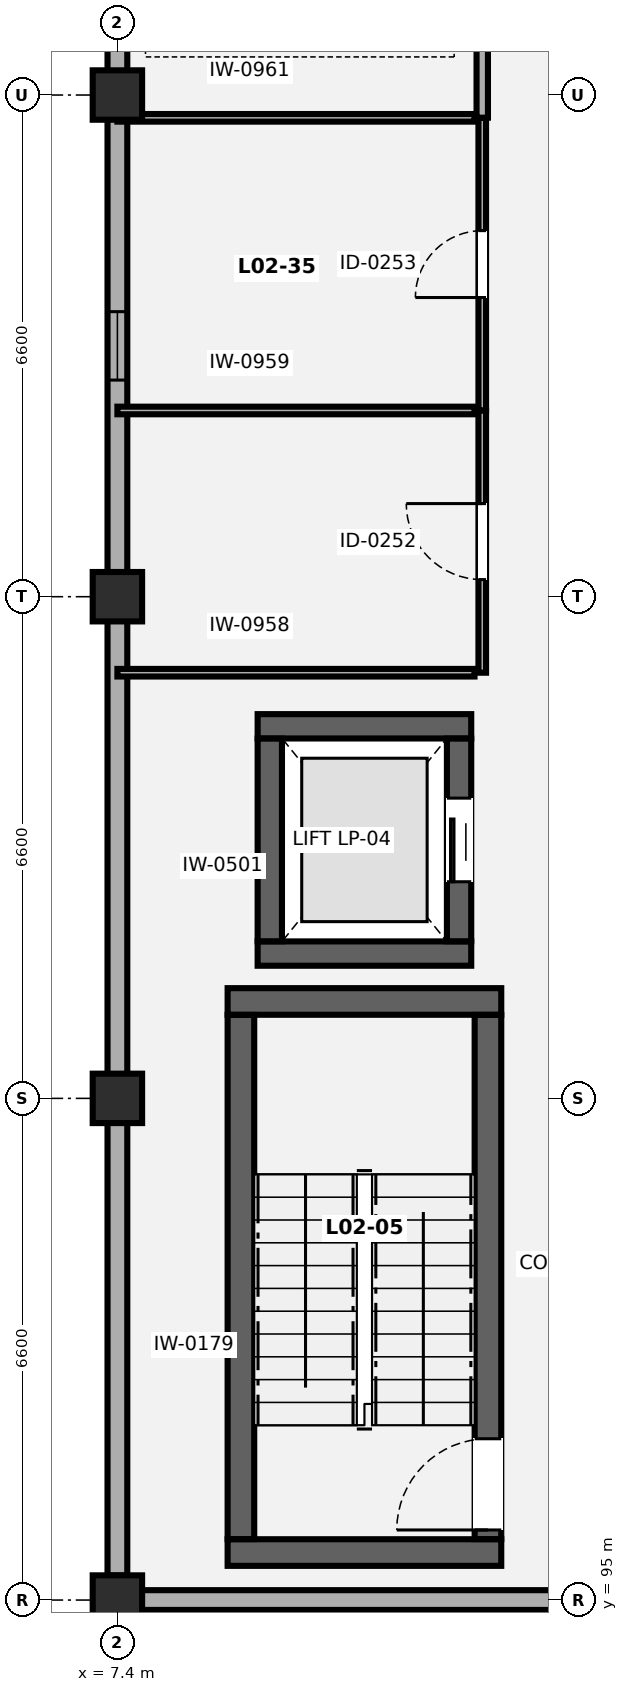
"""IFC4 building model, lengths in metres.
Left out: names, types, materials, properties, quantities, classifications, styles, units other than length and angle.
Written with IfcOpenShell. Run it as: python <this file> out.ifc"""

import sys

from ifc_helpers import new_model, si_unit, direction, frame, frame_2d, origin, origin_2d, place, context, subcontext, project, spatial, rectangle, extrude, element, fill, save


model = new_model("IFC4")
c1 = context("Model", 3, precision=1e-05, world=origin(), true_north=direction((0.0, 1.0)))
c2 = subcontext(c1, "Body", "Model", "MODEL_VIEW")
j1 = project(units=[si_unit("LENGTHUNIT", "METRE"), si_unit("PLANEANGLEUNIT", "RADIAN")], contexts=[c1])
p1 = place(None, origin())
s1 = spatial("IfcSite", under=j1, at=p1, CompositionType="ELEMENT")
p2 = place(p1, origin())
s2 = spatial("IfcBuilding", under=s1, at=p2, CompositionType="ELEMENT")
p3 = place(p2, frame((0.0, 0.0, 9.1)))
s3 = spatial("IfcBuildingStorey", under=s2, at=p3, CompositionType="ELEMENT", Elevation=9.1)
for number, where, z_axis, x_axis in (
    (1, (7.4, 95.0, 0.0), (0.0, 0.0, 1.0), (1.0, 0.0, 0.0)),
    (2, (7.4, 101.6, 0.0), (0.0, 0.0, 1.0), (1.0, 0.0, 0.0)),
    (3, (7.4, 108.2, 0.0), (0.0, 0.0, 1.0), (1.0, 0.0, 0.0)),
    (4, (7.4, 114.8, 0.0), (0.0, 0.0, 1.0), (1.0, 0.0, 0.0)),
):
    element("IfcColumn", number, at=place(p3, frame(where, z_axis=z_axis, x_axis=x_axis)), inside=s3, PredefinedType="COLUMN", context=c2, shape_type="SweptSolid", body=[
        extrude(rectangle(XDim=0.65, YDim=0.65, at=origin_2d()), origin(), (0.0, 0.0, 1.0), 4.2),
    ])
p4 = place(p3, frame((7.4, 95.323, 0.0), z_axis=(0.0, 0.0, 1.0), x_axis=(0.0, 1.0, 0.0)))
e5 = element("IfcWall", 5, at=p4, inside=s3, PredefinedType="SOLIDWALL", context=c2, shape_type="SweptSolid", body=[
    extrude(rectangle(XDim=66.554, YDim=0.26, at=frame_2d((33.277, 0.0))), origin(), (0.0, 0.0, 1.0), 2.885),
])
p5 = place(p4, frame((15.727, 0.0, 0.85)))
e6 = element("IfcOpeningElement", 6, at=p5, cuts=e5, PredefinedType="OPENING", context=c2, shape_type="SweptSolid", body=[
    extrude(rectangle(XDim=0.9, YDim=1.35, at=frame_2d((0.45, 0.675))), frame((0.0, 0.14, 0.0), z_axis=(0.0, -1.0, 0.0), x_axis=(1.0, 0.0, 0.0)), (0.0, 0.0, 1.0), 0.28),
])
p6 = place(p4, frame((28.927, 0.0, 0.85)))
e7 = element("IfcOpeningElement", 7, at=p6, cuts=e5, PredefinedType="OPENING", context=c2, shape_type="SweptSolid", body=[
    extrude(rectangle(XDim=0.9, YDim=1.35, at=frame_2d((0.45, 0.675))), frame((0.0, 0.14, 0.0), z_axis=(0.0, -1.0, 0.0), x_axis=(1.0, 0.0, 0.0)), (0.0, 0.0, 1.0), 0.28),
])
p7 = place(p4, frame((42.127, 0.0, 0.85)))
e8 = element("IfcOpeningElement", 8, at=p7, cuts=e5, PredefinedType="OPENING", context=c2, shape_type="SweptSolid", body=[
    extrude(rectangle(XDim=0.9, YDim=1.35, at=frame_2d((0.45, 0.675))), frame((0.0, 0.14, 0.0), z_axis=(0.0, -1.0, 0.0), x_axis=(1.0, 0.0, 0.0)), (0.0, 0.0, 1.0), 0.28),
])
p8 = place(p4, frame((55.327, 0.0, 0.85)))
e9 = element("IfcOpeningElement", 9, at=p8, cuts=e5, PredefinedType="OPENING", context=c2, shape_type="SweptSolid", body=[
    extrude(rectangle(XDim=0.9, YDim=1.35, at=frame_2d((0.45, 0.675))), frame((0.0, 0.14, 0.0), z_axis=(0.0, -1.0, 0.0), x_axis=(1.0, 0.0, 0.0)), (0.0, 0.0, 1.0), 0.28),
])
p9 = place(p3, frame((26.877, 95.0, 0.0), z_axis=(0.0, 0.0, 1.0), x_axis=(-1.0, 0.0, 0.0)))
e10 = element("IfcWall", 10, at=p9, inside=s3, PredefinedType="SOLIDWALL", context=c2, shape_type="SweptSolid", body=[
    extrude(rectangle(XDim=19.154, YDim=0.26, at=frame_2d((9.577, 0.0))), origin(), (0.0, 0.0, 1.0), 2.48),
])
p10 = place(p9, frame((1.477, 0.0, 0.85)))
e11 = element("IfcOpeningElement", 11, at=p10, cuts=e10, PredefinedType="OPENING", context=c2, shape_type="SweptSolid", body=[
    extrude(rectangle(XDim=1.7, YDim=1.4, at=frame_2d((0.85, 0.7))), frame((0.0, 0.14, 0.0), z_axis=(0.0, -1.0, 0.0), x_axis=(1.0, 0.0, 0.0)), (0.0, 0.0, 1.0), 0.28),
])
for number, where, z_axis, x_axis in (
    (12, (8.85, 95.625, 0.0), (0.0, 0.0, 1.0), (1.0, 0.0, 0.0)),
    (13, (8.85, 102.875, 0.0), (0.0, 0.0, 1.0), (1.0, 0.0, 0.0)),
):
    element("IfcWall", number, at=place(p3, frame(where, z_axis=z_axis, x_axis=x_axis)), inside=s3, PredefinedType="SHEAR", context=c2, shape_type="SweptSolid", body=[
        extrude(rectangle(XDim=3.6, YDim=0.35, at=frame_2d((1.8, 0.0))), origin(), (0.0, 0.0, 1.0), 3.85),
    ])
p11 = place(p3, frame((9.025, 95.802, 0.0), z_axis=(0.0, 0.0, 1.0), x_axis=(0.0, 1.0, 0.0)))
e14 = element("IfcWall", 14, at=p11, inside=s3, PredefinedType="SHEAR", context=c2, shape_type="SweptSolid", body=[
    extrude(rectangle(XDim=6.896, YDim=0.35, at=frame_2d((3.448, 0.0))), origin(), (0.0, 0.0, 1.0), 3.85),
])
p12 = place(p3, frame((12.275, 95.802, 0.0), z_axis=(0.0, 0.0, 1.0), x_axis=(0.0, 1.0, 0.0)))
e15 = element("IfcWall", 15, at=p12, inside=s3, PredefinedType="SHEAR", context=c2, shape_type="SweptSolid", body=[
    extrude(rectangle(XDim=6.896, YDim=0.35, at=frame_2d((3.448, 0.0))), origin(), (0.0, 0.0, 1.0), 3.85),
])
p13 = place(p12, frame((0.12, 0.0, 0.0)))
e16 = element("IfcOpeningElement", 16, at=p13, cuts=e15, PredefinedType="OPENING", context=c2, shape_type="SweptSolid", body=[
    extrude(rectangle(XDim=1.2, YDim=2.15, at=frame_2d((0.6, 1.075))), frame((0.0, 0.185, 0.0), z_axis=(0.0, -1.0, 0.0), x_axis=(1.0, 0.0, 0.0)), (0.0, 0.0, 1.0), 0.37),
])
for number, where, z_axis, x_axis in (
    (17, (9.245, 103.505, 0.0), (0.0, 0.0, 1.0), (1.0, 0.0, 0.0)),
    (18, (9.245, 106.495, 0.0), (0.0, 0.0, 1.0), (1.0, 0.0, 0.0)),
):
    element("IfcWall", number, at=place(p3, frame(where, z_axis=z_axis, x_axis=x_axis)), inside=s3, PredefinedType="SHEAR", context=c2, shape_type="SweptSolid", body=[
        extrude(rectangle(XDim=2.81, YDim=0.32, at=frame_2d((1.405, 0.0))), origin(), (0.0, 0.0, 1.0), 3.85),
    ])
p14 = place(p3, frame((9.405, 103.667, 0.0), z_axis=(0.0, 0.0, 1.0), x_axis=(0.0, 1.0, 0.0)))
e19 = element("IfcWall", 19, at=p14, inside=s3, PredefinedType="SHEAR", context=c2, shape_type="SweptSolid", body=[
    extrude(rectangle(XDim=2.666, YDim=0.32, at=frame_2d((1.333, 0.0))), origin(), (0.0, 0.0, 1.0), 3.85),
])
p15 = place(p3, frame((11.895, 103.667, 0.0), z_axis=(0.0, 0.0, 1.0), x_axis=(0.0, 1.0, 0.0)))
e20 = element("IfcWall", 20, at=p15, inside=s3, PredefinedType="SHEAR", context=c2, shape_type="SweptSolid", body=[
    extrude(rectangle(XDim=2.666, YDim=0.32, at=frame_2d((1.333, 0.0))), origin(), (0.0, 0.0, 1.0), 3.85),
])
p16 = place(p15, frame((0.783, 0.0, 0.0)))
e21 = element("IfcOpeningElement", 21, at=p16, cuts=e20, PredefinedType="OPENING", context=c2, shape_type="SweptSolid", body=[
    extrude(rectangle(XDim=1.1, YDim=2.15, at=frame_2d((0.55, 1.075))), frame((0.0, 0.17, 0.0), z_axis=(0.0, -1.0, 0.0), x_axis=(1.0, 0.0, 0.0)), (0.0, 0.0, 1.0), 0.34),
])
for number, where, z_axis, x_axis in (
    (22, (7.4, 107.2, 0.0), (0.0, 0.0, 1.0), (1.0, 0.0, 0.0)),
    (23, (7.4, 110.65, 0.0), (0.0, 0.0, 1.0), (1.0, 0.0, 0.0)),
):
    element("IfcWall", number, at=place(p3, frame(where, z_axis=z_axis, x_axis=x_axis)), inside=s3, PredefinedType="PARTITIONING", context=c2, shape_type="SweptSolid", body=[
        extrude(rectangle(XDim=4.698, YDim=0.1, at=frame_2d((2.349, 0.0))), origin(), (0.0, 0.0, 1.0), 3.85),
    ])
p17 = place(p3, frame((12.2, 107.2, 0.0), z_axis=(0.0, 0.0, 1.0), x_axis=(0.0, 1.0, 0.0)))
e24 = element("IfcWall", 24, at=p17, inside=s3, PredefinedType="PARTITIONING", context=c2, shape_type="SweptSolid", body=[
    extrude(rectangle(XDim=3.45, YDim=0.1, at=frame_2d((1.725, 0.0))), origin(), (0.0, 0.0, 1.0), 3.85),
])
p18 = place(p17, frame((1.225, 0.0, 0.0)))
e25 = element("IfcOpeningElement", 25, at=p18, cuts=e24, PredefinedType="OPENING", context=c2, shape_type="SweptSolid", body=[
    extrude(rectangle(XDim=1.0, YDim=2.1, at=frame_2d((0.5, 1.05))), frame((0.0, 0.06, 0.0), z_axis=(0.0, -1.0, 0.0), x_axis=(1.0, 0.0, 0.0)), (0.0, 0.0, 1.0), 0.12),
])
p19 = place(p3, frame((7.4, 114.5, 0.0), z_axis=(0.0, 0.0, 1.0), x_axis=(1.0, 0.0, 0.0)))
e26 = element("IfcWall", 26, at=p19, inside=s3, PredefinedType="PARTITIONING", context=c2, shape_type="SweptSolid", body=[
    extrude(rectangle(XDim=4.698, YDim=0.1, at=frame_2d((2.349, 0.0))), origin(), (0.0, 0.0, 1.0), 2.435),
])
p20 = place(p3, frame((12.2, 110.652, 0.0), z_axis=(0.0, 0.0, 1.0), x_axis=(0.0, 1.0, 0.0)))
e27 = element("IfcWall", 27, at=p20, inside=s3, PredefinedType="PARTITIONING", context=c2, shape_type="SweptSolid", body=[
    extrude(rectangle(XDim=3.848, YDim=0.1, at=frame_2d((1.924, 0.0))), origin(), (0.0, 0.0, 1.0), 3.85),
])
p21 = place(p20, frame((1.484, 0.0, 0.0)))
e28 = element("IfcOpeningElement", 28, at=p21, cuts=e27, PredefinedType="OPENING", context=c2, shape_type="SweptSolid", body=[
    extrude(rectangle(XDim=0.88, YDim=2.08, at=frame_2d((0.44, 1.04))), frame((0.0, 0.06, 0.0), z_axis=(0.0, -1.0, 0.0), x_axis=(1.0, 0.0, 0.0)), (0.0, 0.0, 1.0), 0.12),
])
p22 = place(p3, frame((12.2, 114.502, 0.0), z_axis=(0.0, 0.0, 1.0), x_axis=(0.0, 1.0, 0.0)))
e29 = element("IfcWall", 29, at=p22, inside=s3, PredefinedType="PARTITIONING", context=c2, shape_type="SweptSolid", body=[
    extrude(rectangle(XDim=13.298, YDim=0.15, at=frame_2d((6.649, 0.0))), origin(), (0.0, 0.0, 1.0), 3.85),
])
p23 = place(p22, frame((5.649, 0.0, 0.0)))
e30 = element("IfcOpeningElement", 30, at=p23, cuts=e29, PredefinedType="OPENING", context=c2, shape_type="SweptSolid", body=[
    extrude(rectangle(XDim=1.3, YDim=2.2, at=frame_2d((0.65, 1.1))), frame((0.0, 0.085, 0.0), z_axis=(0.0, -1.0, 0.0), x_axis=(1.0, 0.0, 0.0)), (0.0, 0.0, 1.0), 0.17),
])
p24 = place(p5, origin())
e31 = element("IfcWindow", 31, at=p24, inside=s3, PartitioningType="SINGLE_PANEL", PredefinedType="WINDOW", context=c2, shape_type="SweptSolid", body=[
    extrude(rectangle(XDim=0.9, YDim=1.35, at=frame_2d((0.45, 0.675))), frame((0.0, 0.03, 0.0), z_axis=(0.0, -1.0, 0.0), x_axis=(1.0, 0.0, 0.0)), (0.0, 0.0, 1.0), 0.06),
])
fill(e6, e31)
p25 = place(p13, origin())
e32 = element("IfcDoor", 32, at=p25, inside=s3, OperationType="SINGLE_SWING_LEFT", PredefinedType="DOOR", context=c2, shape_type="SweptSolid", body=[
    extrude(rectangle(XDim=1.2, YDim=2.15, at=frame_2d((0.6, 1.075))), frame((0.0, 0.025, 0.0), z_axis=(0.0, -1.0, 0.0), x_axis=(1.0, 0.0, 0.0)), (0.0, 0.0, 1.0), 0.05),
])
fill(e16, e32)
p26 = place(p16, origin())
e33 = element("IfcDoor", 33, at=p26, inside=s3, OperationType="SLIDING_TO_LEFT", PredefinedType="DOOR", context=c2, shape_type="SweptSolid", body=[
    extrude(rectangle(XDim=1.1, YDim=2.15, at=frame_2d((0.55, 1.075))), frame((0.0, 0.025, 0.0), z_axis=(0.0, -1.0, 0.0), x_axis=(1.0, 0.0, 0.0)), (0.0, 0.0, 1.0), 0.05),
])
fill(e21, e33)
p27 = place(p18, origin())
e34 = element("IfcDoor", 34, at=p27, inside=s3, OperationType="SINGLE_SWING_RIGHT", PredefinedType="DOOR", context=c2, shape_type="SweptSolid", body=[
    extrude(rectangle(XDim=1.0, YDim=2.1, at=frame_2d((0.5, 1.05))), frame((0.0, 0.025, 0.0), z_axis=(0.0, -1.0, 0.0), x_axis=(1.0, 0.0, 0.0)), (0.0, 0.0, 1.0), 0.05),
])
fill(e25, e34)
p28 = place(p21, origin())
e35 = element("IfcDoor", 35, at=p28, inside=s3, OperationType="SINGLE_SWING_LEFT", PredefinedType="DOOR", context=c2, shape_type="SweptSolid", body=[
    extrude(rectangle(XDim=0.88, YDim=2.08, at=frame_2d((0.44, 1.04))), frame((0.0, 0.025, 0.0), z_axis=(0.0, -1.0, 0.0), x_axis=(1.0, 0.0, 0.0)), (0.0, 0.0, 1.0), 0.05),
])
fill(e28, e35)
save(model, sys.argv[1])
